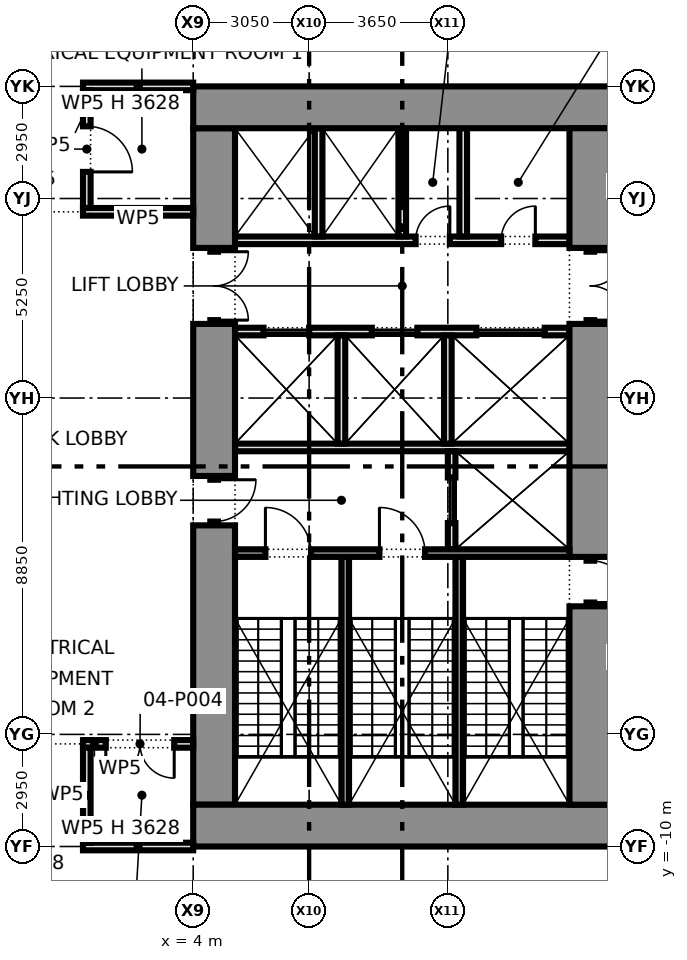
"""IFC4 building model, lengths in metres.
Left out: names, types, materials, properties, quantities, classifications, styles, units other than length and angle.
Written with IfcOpenShell. Run it as: python <this file> out.ifc"""

import sys

from ifc_helpers import new_model, si_unit, direction, frame, frame_2d, origin, place, context, subcontext, project, spatial, rectangle, extrude, element, fill, save


model = new_model("IFC4")
c1 = context("Model", 3, precision=1e-05, world=origin(), true_north=direction((0.0, 1.0)))
c2 = subcontext(c1, "Body", "Model", "MODEL_VIEW")
j1 = project(units=[si_unit("LENGTHUNIT", "METRE"), si_unit("PLANEANGLEUNIT", "RADIAN")], contexts=[c1])
p1 = place(None, origin())
s1 = spatial("IfcSite", under=j1, at=p1, CompositionType="ELEMENT")
p2 = place(p1, origin())
s2 = spatial("IfcBuilding", under=s1, at=p2, CompositionType="ELEMENT")
p3 = place(p2, frame((0.0, 0.0, 16.1)))
s3 = spatial("IfcBuildingStorey", under=s2, at=p3, CompositionType="ELEMENT", Elevation=16.1)
for number, where, z_axis, x_axis in (
    (1, (15.0, 9.45, 0.0), (0.0, 0.0, 1.0), (-1.0, 0.0, 0.0)),
    (2, (15.0, -9.45, 0.0), (0.0, 0.0, 1.0), (-1.0, 0.0, 0.0)),
):
    element("IfcWall", number, at=place(p3, frame(where, z_axis=z_axis, x_axis=x_axis)), inside=s3, PredefinedType="SHEAR", context=c2, shape_type="SweptSolid", body=[
        extrude(rectangle(XDim=11.0, YDim=1.1, at=frame_2d((5.5, 0.0))), origin(), (0.0, 0.0, 1.0), 4.575),
    ])
p4 = place(p3, frame((14.45, 8.9, 0.0), z_axis=(0.0, 0.0, 1.0), x_axis=(0.0, -1.0, 0.0)))
e3 = element("IfcWall", 3, at=p4, inside=s3, PredefinedType="SHEAR", context=c2, shape_type="SweptSolid", body=[
    extrude(rectangle(XDim=3.15, YDim=1.1, at=frame_2d((1.575, 0.0))), origin(), (0.0, 0.0, 1.0), 4.575),
])
p5 = place(p3, frame((14.45, 5.75, 0.0), z_axis=(0.0, 0.0, 1.0), x_axis=(0.0, -1.0, 0.0)))
e4 = element("IfcWall", 4, at=p5, inside=s3, PredefinedType="PARTITIONING", context=c2, shape_type="SweptSolid", body=[
    extrude(rectangle(XDim=2.0, YDim=0.2, at=frame_2d((1.0, 0.0))), origin(), (0.0, 0.0, 1.0), 2.4),
])
p6 = place(p5, frame((0.1, 0.0, 0.0)))
e5 = element("IfcOpeningElement", 5, at=p6, cuts=e4, PredefinedType="OPENING", context=c2, shape_type="SweptSolid", body=[
    extrude(rectangle(XDim=1.8, YDim=2.1, at=frame_2d((0.9, 1.05))), frame((0.0, 0.11, 0.0), z_axis=(0.0, -1.0, 0.0), x_axis=(1.0, 0.0, 0.0)), (0.0, 0.0, 1.0), 0.22),
])
p7 = place(p3, frame((14.45, 3.75, 0.0), z_axis=(0.0, 0.0, 1.0), x_axis=(0.0, -1.0, 0.0)))
e6 = element("IfcWall", 6, at=p7, inside=s3, PredefinedType="SHEAR", context=c2, shape_type="SweptSolid", body=[
    extrude(rectangle(XDim=6.13, YDim=1.1, at=frame_2d((3.065, 0.0))), origin(), (0.0, 0.0, 1.0), 4.575),
])
p8 = place(p3, frame((14.45, -2.38, 0.0), z_axis=(0.0, 0.0, 1.0), x_axis=(0.0, -1.0, 0.0)))
e7 = element("IfcWall", 7, at=p8, inside=s3, PredefinedType="SHEAR", context=c2, shape_type="SweptSolid", body=[
    extrude(rectangle(XDim=1.3, YDim=0.2, at=frame_2d((0.65, 0.0))), origin(), (0.0, 0.0, 1.0), 2.4),
])
p9 = place(p8, frame((0.1, 0.0, 0.0)))
e8 = element("IfcOpeningElement", 8, at=p9, cuts=e7, PredefinedType="OPENING", context=c2, shape_type="SweptSolid", body=[
    extrude(rectangle(XDim=1.1, YDim=2.1, at=frame_2d((0.55, 1.05))), frame((0.0, 0.11, 0.0), z_axis=(0.0, -1.0, 0.0), x_axis=(1.0, 0.0, 0.0)), (0.0, 0.0, 1.0), 0.22),
])
p10 = place(p3, frame((14.45, -3.68, 0.0), z_axis=(0.0, 0.0, 1.0), x_axis=(0.0, -1.0, 0.0)))
e9 = element("IfcWall", 9, at=p10, inside=s3, PredefinedType="SHEAR", context=c2, shape_type="SweptSolid", body=[
    extrude(rectangle(XDim=5.22, YDim=1.1, at=frame_2d((2.61, 0.0))), origin(), (0.0, 0.0, 1.0), 4.575),
])
p11 = place(p3, frame((4.55, 8.9, 0.0), z_axis=(0.0, 0.0, 1.0), x_axis=(0.0, -1.0, 0.0)))
e10 = element("IfcWall", 10, at=p11, inside=s3, PredefinedType="SHEAR", context=c2, shape_type="SweptSolid", body=[
    extrude(rectangle(XDim=3.15, YDim=1.1, at=frame_2d((1.575, 0.0))), origin(), (0.0, 0.0, 1.0), 4.575),
])
p12 = place(p3, frame((4.55, 5.75, 0.0), z_axis=(0.0, 0.0, 1.0), x_axis=(0.0, -1.0, 0.0)))
e11 = element("IfcWall", 11, at=p12, inside=s3, PredefinedType="PARTITIONING", context=c2, shape_type="SweptSolid", body=[
    extrude(rectangle(XDim=2.0, YDim=0.2, at=frame_2d((1.0, 0.0))), origin(), (0.0, 0.0, 1.0), 2.4),
])
p13 = place(p12, frame((0.1, 0.0, 0.0)))
e12 = element("IfcOpeningElement", 12, at=p13, cuts=e11, PredefinedType="OPENING", context=c2, shape_type="SweptSolid", body=[
    extrude(rectangle(XDim=1.8, YDim=2.1, at=frame_2d((0.9, 1.05))), frame((0.0, 0.11, 0.0), z_axis=(0.0, -1.0, 0.0), x_axis=(1.0, 0.0, 0.0)), (0.0, 0.0, 1.0), 0.22),
])
p14 = place(p3, frame((4.55, 3.75, 0.0), z_axis=(0.0, 0.0, 1.0), x_axis=(0.0, -1.0, 0.0)))
e13 = element("IfcWall", 13, at=p14, inside=s3, PredefinedType="SHEAR", context=c2, shape_type="SweptSolid", body=[
    extrude(rectangle(XDim=4.0, YDim=1.1, at=frame_2d((2.0, 0.0))), origin(), (0.0, 0.0, 1.0), 4.575),
])
p15 = place(p3, frame((4.55, -0.25, 0.0), z_axis=(0.0, 0.0, 1.0), x_axis=(0.0, -1.0, 0.0)))
e14 = element("IfcWall", 14, at=p15, inside=s3, PredefinedType="PARTITIONING", context=c2, shape_type="SweptSolid", body=[
    extrude(rectangle(XDim=1.3, YDim=0.2, at=frame_2d((0.65, 0.0))), origin(), (0.0, 0.0, 1.0), 2.4),
])
p16 = place(p15, frame((0.1, 0.0, 0.0)))
e15 = element("IfcOpeningElement", 15, at=p16, cuts=e14, PredefinedType="OPENING", context=c2, shape_type="SweptSolid", body=[
    extrude(rectangle(XDim=1.1, YDim=2.1, at=frame_2d((0.55, 1.05))), frame((0.0, 0.11, 0.0), z_axis=(0.0, -1.0, 0.0), x_axis=(1.0, 0.0, 0.0)), (0.0, 0.0, 1.0), 0.22),
])
p17 = place(p3, frame((4.55, -1.55, 0.0), z_axis=(0.0, 0.0, 1.0), x_axis=(0.0, -1.0, 0.0)))
e16 = element("IfcWall", 16, at=p17, inside=s3, PredefinedType="SHEAR", context=c2, shape_type="SweptSolid", body=[
    extrude(rectangle(XDim=7.35, YDim=1.1, at=frame_2d((3.675, 0.0))), origin(), (0.0, 0.0, 1.0), 4.575),
])
p18 = place(p3, frame((13.9, 5.95, 0.0), z_axis=(0.0, 0.0, 1.0), x_axis=(-1.0, 0.0, 0.0)))
e17 = element("IfcWall", 17, at=p18, inside=s3, PredefinedType="PARTITIONING", context=c2, shape_type="SweptSolid", body=[
    extrude(rectangle(XDim=8.8, YDim=0.2, at=frame_2d((4.4, 0.0))), origin(), (0.0, 0.0, 1.0), 4.575),
])
p19 = place(p18, frame((0.897, 0.0, 0.0)))
e18 = element("IfcOpeningElement", 18, at=p19, cuts=e17, PredefinedType="OPENING", context=c2, shape_type="SweptSolid", body=[
    extrude(rectangle(XDim=0.9, YDim=2.1, at=frame_2d((0.45, 1.05))), frame((0.0, 0.11, 0.0), z_axis=(0.0, -1.0, 0.0), x_axis=(1.0, 0.0, 0.0)), (0.0, 0.0, 1.0), 0.22),
])
p20 = place(p18, frame((3.147, 0.0, 0.0)))
e19 = element("IfcOpeningElement", 19, at=p20, cuts=e17, PredefinedType="OPENING", context=c2, shape_type="SweptSolid", body=[
    extrude(rectangle(XDim=0.9, YDim=2.1, at=frame_2d((0.45, 1.05))), frame((0.0, 0.11, 0.0), z_axis=(0.0, -1.0, 0.0), x_axis=(1.0, 0.0, 0.0)), (0.0, 0.0, 1.0), 0.22),
])
p21 = place(p3, frame((13.9, 3.55, 0.0), z_axis=(0.0, 0.0, 1.0), x_axis=(-1.0, 0.0, 0.0)))
e20 = element("IfcWall", 20, at=p21, inside=s3, PredefinedType="PARTITIONING", context=c2, shape_type="SweptSolid", body=[
    extrude(rectangle(XDim=8.8, YDim=0.2, at=frame_2d((4.4, 0.0))), origin(), (0.0, 0.0, 1.0), 4.575),
])
p22 = place(p21, frame((0.65, 0.0, 0.0)))
e21 = element("IfcOpeningElement", 21, at=p22, cuts=e20, PredefinedType="OPENING", context=c2, shape_type="SweptSolid", body=[
    extrude(rectangle(XDim=1.8, YDim=2.1, at=frame_2d((0.9, 1.05))), frame((0.0, 0.11, 0.0), z_axis=(0.0, -1.0, 0.0), x_axis=(1.0, 0.0, 0.0)), (0.0, 0.0, 1.0), 0.22),
])
p23 = place(p21, frame((4.0, 0.0, 0.0)))
e22 = element("IfcOpeningElement", 22, at=p23, cuts=e20, PredefinedType="OPENING", context=c2, shape_type="SweptSolid", body=[
    extrude(rectangle(XDim=1.2, YDim=2.1, at=frame_2d((0.6, 1.05))), frame((0.0, 0.11, 0.0), z_axis=(0.0, -1.0, 0.0), x_axis=(1.0, 0.0, 0.0)), (0.0, 0.0, 1.0), 0.22),
])
p24 = place(p21, frame((6.85, 0.0, 0.0)))
e23 = element("IfcOpeningElement", 23, at=p24, cuts=e20, PredefinedType="OPENING", context=c2, shape_type="SweptSolid", body=[
    extrude(rectangle(XDim=1.2, YDim=2.1, at=frame_2d((0.6, 1.05))), frame((0.0, 0.11, 0.0), z_axis=(0.0, -1.0, 0.0), x_axis=(1.0, 0.0, 0.0)), (0.0, 0.0, 1.0), 0.22),
])
p25 = place(p3, frame((13.9, 0.5, 0.0), z_axis=(0.0, 0.0, 1.0), x_axis=(-1.0, 0.0, 0.0)))
e24 = element("IfcWall", 24, at=p25, inside=s3, PredefinedType="PARTITIONING", context=c2, shape_type="SweptSolid", body=[
    extrude(rectangle(XDim=8.8, YDim=0.2, at=frame_2d((4.4, 0.0))), origin(), (0.0, 0.0, 1.0), 4.575),
])
p26 = place(p3, frame((10.8, 0.4, 0.0), z_axis=(0.0, 0.0, 1.0), x_axis=(0.0, -1.0, 0.0)))
e25 = element("IfcWall", 25, at=p26, inside=s3, PredefinedType="PARTITIONING", context=c2, shape_type="SweptSolid", body=[
    extrude(rectangle(XDim=2.58, YDim=0.2, at=frame_2d((1.29, 0.0))), origin(), (0.0, 0.0, 1.0), 4.575),
])
p27 = place(p26, frame((0.69, 0.0, 0.0)))
e26 = element("IfcOpeningElement", 26, at=p27, cuts=e25, PredefinedType="OPENING", context=c2, shape_type="SweptSolid", body=[
    extrude(rectangle(XDim=1.2, YDim=2.1, at=frame_2d((0.6, 1.05))), frame((0.0, 0.11, 0.0), z_axis=(0.0, -1.0, 0.0), x_axis=(1.0, 0.0, 0.0)), (0.0, 0.0, 1.0), 0.22),
])
p28 = place(p3, frame((13.9, -2.28, 0.0), z_axis=(0.0, 0.0, 1.0), x_axis=(-1.0, 0.0, 0.0)))
e27 = element("IfcWall", 27, at=p28, inside=s3, PredefinedType="SHEAR", context=c2, shape_type="SweptSolid", body=[
    extrude(rectangle(XDim=8.8, YDim=0.2, at=frame_2d((4.4, 0.0))), origin(), (0.0, 0.0, 1.0), 4.575),
])
p29 = place(p28, frame((3.8, 0.0, 0.0)))
e28 = element("IfcOpeningElement", 28, at=p29, cuts=e27, PredefinedType="OPENING", context=c2, shape_type="SweptSolid", body=[
    extrude(rectangle(XDim=1.2, YDim=2.1, at=frame_2d((0.6, 1.05))), frame((0.0, 0.11, 0.0), z_axis=(0.0, -1.0, 0.0), x_axis=(1.0, 0.0, 0.0)), (0.0, 0.0, 1.0), 0.22),
])
p30 = place(p28, frame((6.8, 0.0, 0.0)))
e29 = element("IfcOpeningElement", 29, at=p30, cuts=e27, PredefinedType="OPENING", context=c2, shape_type="SweptSolid", body=[
    extrude(rectangle(XDim=1.2, YDim=2.1, at=frame_2d((0.6, 1.05))), frame((0.0, 0.11, 0.0), z_axis=(0.0, -1.0, 0.0), x_axis=(1.0, 0.0, 0.0)), (0.0, 0.0, 1.0), 0.22),
])
for number, where, z_axis, x_axis in (
    (30, (11.0, -2.38, 0.0), (0.0, 0.0, 1.0), (0.0, -1.0, 0.0)),
    (31, (8.0, -2.38, 0.0), (0.0, 0.0, 1.0), (0.0, -1.0, 0.0)),
):
    element("IfcWall", number, at=place(p3, frame(where, z_axis=z_axis, x_axis=x_axis)), inside=s3, PredefinedType="SHEAR", context=c2, shape_type="SweptSolid", body=[
        extrude(rectangle(XDim=6.52, YDim=0.2, at=frame_2d((3.26, 0.0))), origin(), (0.0, 0.0, 1.0), 4.575),
    ])
for number, where, z_axis, x_axis in (
    (32, (9.5, 8.9, 0.0), (0.0, 0.0, 1.0), (0.0, -1.0, 0.0)),
    (33, (7.3, 8.9, 0.0), (0.0, 0.0, 1.0), (0.0, -1.0, 0.0)),
    (34, (11.105, 8.9, 0.0), (0.0, 0.0, 1.0), (0.0, -1.0, 0.0)),
    (35, (10.7, 3.45, 0.0), (0.0, 0.0, 1.0), (0.0, -1.0, 0.0)),
    (36, (7.9, 3.45, 0.0), (0.0, 0.0, 1.0), (0.0, -1.0, 0.0)),
):
    element("IfcWall", number, at=place(p3, frame(where, z_axis=z_axis, x_axis=x_axis)), inside=s3, PredefinedType="PARTITIONING", context=c2, shape_type="SweptSolid", body=[
        extrude(rectangle(XDim=2.85, YDim=0.2, at=frame_2d((1.425, 0.0))), origin(), (0.0, 0.0, 1.0), 4.575),
    ])
p31 = place(p3, frame((1.1, -10.0, 0.0), z_axis=(0.0, 0.0, 1.0), x_axis=(1.0, 0.0, 0.0)))
e37 = element("IfcWall", 37, at=p31, inside=s3, PredefinedType="PARTITIONING", context=c2, shape_type="SweptSolid", body=[
    extrude(rectangle(XDim=2.9, YDim=0.2, at=frame_2d((1.45, 0.0))), origin(), (0.0, 0.0, 1.0), 3.627),
])
p32 = place(p3, frame((1.1, -7.3, 0.0), z_axis=(0.0, 0.0, 1.0), x_axis=(1.0, 0.0, 0.0)))
e38 = element("IfcWall", 38, at=p32, inside=s3, PredefinedType="PARTITIONING", context=c2, shape_type="SweptSolid", body=[
    extrude(rectangle(XDim=2.9, YDim=0.2, at=frame_2d((1.45, 0.0))), origin(), (0.0, 0.0, 1.0), 4.575),
])
p33 = place(p32, frame((0.6, 0.0, 0.0)))
e39 = element("IfcOpeningElement", 39, at=p33, cuts=e38, PredefinedType="OPENING", context=c2, shape_type="SweptSolid", body=[
    extrude(rectangle(XDim=1.8, YDim=2.1, at=frame_2d((0.9, 1.05))), frame((0.0, 0.11, 0.0), z_axis=(0.0, -1.0, 0.0), x_axis=(1.0, 0.0, 0.0)), (0.0, 0.0, 1.0), 0.22),
])
p34 = place(p3, frame((1.1, 6.7, 0.0), z_axis=(0.0, 0.0, 1.0), x_axis=(1.0, 0.0, 0.0)))
e40 = element("IfcWall", 40, at=p34, inside=s3, PredefinedType="PARTITIONING", context=c2, shape_type="SweptSolid", body=[
    extrude(rectangle(XDim=2.9, YDim=0.2, at=frame_2d((1.45, 0.0))), origin(), (0.0, 0.0, 1.0), 4.575),
])
p35 = place(p3, frame((1.1, 10.0, 0.0), z_axis=(0.0, 0.0, 1.0), x_axis=(1.0, 0.0, 0.0)))
e41 = element("IfcWall", 41, at=p35, inside=s3, PredefinedType="PARTITIONING", context=c2, shape_type="SweptSolid", body=[
    extrude(rectangle(XDim=2.9, YDim=0.2, at=frame_2d((1.45, 0.0))), origin(), (0.0, 0.0, 1.0), 3.627),
])
p36 = place(p3, frame((1.2, -9.9, 0.0), z_axis=(0.0, 0.0, 1.0), x_axis=(0.0, 1.0, 0.0)))
e42 = element("IfcWall", 42, at=p36, inside=s3, PredefinedType="PARTITIONING", context=c2, shape_type="SweptSolid", body=[
    extrude(rectangle(XDim=2.5, YDim=0.2, at=frame_2d((1.25, 0.0))), origin(), (0.0, 0.0, 1.0), 4.575),
])
p37 = place(p3, frame((1.2, 6.8, 0.0), z_axis=(0.0, 0.0, 1.0), x_axis=(0.0, 1.0, 0.0)))
e43 = element("IfcWall", 43, at=p37, inside=s3, PredefinedType="PARTITIONING", context=c2, shape_type="SweptSolid", body=[
    extrude(rectangle(XDim=3.1, YDim=0.2, at=frame_2d((1.55, 0.0))), origin(), (0.0, 0.0, 1.0), 4.575),
])
p38 = place(p37, frame((0.95, 0.0, 0.0)))
e44 = element("IfcOpeningElement", 44, at=p38, cuts=e43, PredefinedType="OPENING", context=c2, shape_type="SweptSolid", body=[
    extrude(rectangle(XDim=1.2, YDim=2.1, at=frame_2d((0.6, 1.05))), frame((0.0, 0.11, 0.0), z_axis=(0.0, -1.0, 0.0), x_axis=(1.0, 0.0, 0.0)), (0.0, 0.0, 1.0), 0.22),
])
p39 = place(p6, origin())
e45 = element("IfcDoor", 45, at=p39, inside=s3, OperationType="DOUBLE_DOOR_SINGLE_SWING", PredefinedType="DOOR", context=c2, shape_type="SweptSolid", body=[
    extrude(rectangle(XDim=1.8, YDim=2.1, at=frame_2d((0.9, 1.05))), frame((0.0, 0.025, 0.0), z_axis=(0.0, -1.0, 0.0), x_axis=(1.0, 0.0, 0.0)), (0.0, 0.0, 1.0), 0.05),
])
fill(e5, e45)
p40 = place(p9, origin())
e46 = element("IfcDoor", 46, at=p40, inside=s3, OperationType="SINGLE_SWING_RIGHT", PredefinedType="DOOR", context=c2, shape_type="SweptSolid", body=[
    extrude(rectangle(XDim=1.1, YDim=2.1, at=frame_2d((0.55, 1.05))), frame((0.0, 0.025, 0.0), z_axis=(0.0, -1.0, 0.0), x_axis=(1.0, 0.0, 0.0)), (0.0, 0.0, 1.0), 0.05),
])
fill(e8, e46)
p41 = place(p13, origin())
e47 = element("IfcDoor", 47, at=p41, inside=s3, OperationType="DOUBLE_DOOR_SINGLE_SWING", PredefinedType="DOOR", context=c2, shape_type="SweptSolid", body=[
    extrude(rectangle(XDim=1.8, YDim=2.1, at=frame_2d((0.9, 1.05))), frame((0.0, 0.025, 0.0), z_axis=(0.0, -1.0, 0.0), x_axis=(1.0, 0.0, 0.0)), (0.0, 0.0, 1.0), 0.05),
])
fill(e12, e47)
p42 = place(p16, origin())
e48 = element("IfcDoor", 48, at=p42, inside=s3, OperationType="SINGLE_SWING_LEFT", PredefinedType="DOOR", context=c2, shape_type="SweptSolid", body=[
    extrude(rectangle(XDim=1.1, YDim=2.1, at=frame_2d((0.55, 1.05))), frame((0.0, 0.025, 0.0), z_axis=(0.0, -1.0, 0.0), x_axis=(1.0, 0.0, 0.0)), (0.0, 0.0, 1.0), 0.05),
])
fill(e15, e48)
p43 = place(p22, origin())
e49 = element("IfcDoor", 49, at=p43, inside=s3, OperationType="DOUBLE_DOOR_SLIDING", PredefinedType="DOOR", context=c2, shape_type="SweptSolid", body=[
    extrude(rectangle(XDim=1.8, YDim=2.1, at=frame_2d((0.9, 1.05))), frame((0.0, 0.025, 0.0), z_axis=(0.0, -1.0, 0.0), x_axis=(1.0, 0.0, 0.0)), (0.0, 0.0, 1.0), 0.05),
])
fill(e21, e49)
p44 = place(p23, origin())
e50 = element("IfcDoor", 50, at=p44, inside=s3, OperationType="DOUBLE_DOOR_SLIDING", PredefinedType="DOOR", context=c2, shape_type="SweptSolid", body=[
    extrude(rectangle(XDim=1.2, YDim=2.1, at=frame_2d((0.6, 1.05))), frame((0.0, 0.025, 0.0), z_axis=(0.0, -1.0, 0.0), x_axis=(1.0, 0.0, 0.0)), (0.0, 0.0, 1.0), 0.05),
])
fill(e22, e50)
p45 = place(p24, origin())
e51 = element("IfcDoor", 51, at=p45, inside=s3, OperationType="DOUBLE_DOOR_SLIDING", PredefinedType="DOOR", context=c2, shape_type="SweptSolid", body=[
    extrude(rectangle(XDim=1.2, YDim=2.1, at=frame_2d((0.6, 1.05))), frame((0.0, 0.025, 0.0), z_axis=(0.0, -1.0, 0.0), x_axis=(1.0, 0.0, 0.0)), (0.0, 0.0, 1.0), 0.05),
])
fill(e23, e51)
p46 = place(p27, origin())
e52 = element("IfcDoor", 52, at=p46, inside=s3, OperationType="DOUBLE_DOOR_SLIDING", PredefinedType="DOOR", context=c2, shape_type="SweptSolid", body=[
    extrude(rectangle(XDim=1.2, YDim=2.1, at=frame_2d((0.6, 1.05))), frame((0.0, 0.025, 0.0), z_axis=(0.0, -1.0, 0.0), x_axis=(1.0, 0.0, 0.0)), (0.0, 0.0, 1.0), 0.05),
])
fill(e26, e52)
p47 = place(p19, frame((0.9, 0.0, 0.0), z_axis=(0.0, 0.0, 1.0), x_axis=(-1.0, 0.0, 0.0)))
e53 = element("IfcDoor", 53, at=p47, inside=s3, OperationType="SINGLE_SWING_RIGHT", PredefinedType="DOOR", context=c2, shape_type="SweptSolid", body=[
    extrude(rectangle(XDim=0.9, YDim=2.1, at=frame_2d((0.45, 1.05))), frame((0.0, 0.025, 0.0), z_axis=(0.0, -1.0, 0.0), x_axis=(1.0, 0.0, 0.0)), (0.0, 0.0, 1.0), 0.05),
])
fill(e18, e53)
p48 = place(p20, frame((0.9, 0.0, 0.0), z_axis=(0.0, 0.0, 1.0), x_axis=(-1.0, 0.0, 0.0)))
e54 = element("IfcDoor", 54, at=p48, inside=s3, OperationType="SINGLE_SWING_RIGHT", PredefinedType="DOOR", context=c2, shape_type="SweptSolid", body=[
    extrude(rectangle(XDim=0.9, YDim=2.1, at=frame_2d((0.45, 1.05))), frame((0.0, 0.025, 0.0), z_axis=(0.0, -1.0, 0.0), x_axis=(1.0, 0.0, 0.0)), (0.0, 0.0, 1.0), 0.05),
])
fill(e19, e54)
p49 = place(p29, frame((1.2, 0.0, 0.0), z_axis=(0.0, 0.0, 1.0), x_axis=(-1.0, 0.0, 0.0)))
e55 = element("IfcDoor", 55, at=p49, inside=s3, OperationType="SINGLE_SWING_LEFT", PredefinedType="DOOR", context=c2, shape_type="SweptSolid", body=[
    extrude(rectangle(XDim=1.2, YDim=2.1, at=frame_2d((0.6, 1.05))), frame((0.0, 0.025, 0.0), z_axis=(0.0, -1.0, 0.0), x_axis=(1.0, 0.0, 0.0)), (0.0, 0.0, 1.0), 0.05),
])
fill(e28, e55)
p50 = place(p30, frame((1.2, 0.0, 0.0), z_axis=(0.0, 0.0, 1.0), x_axis=(-1.0, 0.0, 0.0)))
e56 = element("IfcDoor", 56, at=p50, inside=s3, OperationType="SINGLE_SWING_LEFT", PredefinedType="DOOR", context=c2, shape_type="SweptSolid", body=[
    extrude(rectangle(XDim=1.2, YDim=2.1, at=frame_2d((0.6, 1.05))), frame((0.0, 0.025, 0.0), z_axis=(0.0, -1.0, 0.0), x_axis=(1.0, 0.0, 0.0)), (0.0, 0.0, 1.0), 0.05),
])
fill(e29, e56)
p51 = place(p38, frame((1.2, 0.0, 0.0), z_axis=(0.0, 0.0, 1.0), x_axis=(-1.0, 0.0, 0.0)))
e57 = element("IfcDoor", 57, at=p51, inside=s3, OperationType="SINGLE_SWING_RIGHT", PredefinedType="DOOR", context=c2, shape_type="SweptSolid", body=[
    extrude(rectangle(XDim=1.2, YDim=2.1, at=frame_2d((0.6, 1.05))), frame((0.0, 0.025, 0.0), z_axis=(0.0, -1.0, 0.0), x_axis=(1.0, 0.0, 0.0)), (0.0, 0.0, 1.0), 0.05),
])
fill(e44, e57)
p52 = place(p33, frame((1.8, 0.0, 0.0), z_axis=(0.0, 0.0, 1.0), x_axis=(-1.0, 0.0, 0.0)))
e58 = element("IfcDoor", 58, at=p52, inside=s3, OperationType="DOUBLE_DOOR_SINGLE_SWING", PredefinedType="DOOR", context=c2, shape_type="SweptSolid", body=[
    extrude(rectangle(XDim=1.8, YDim=2.1, at=frame_2d((0.9, 1.05))), frame((0.0, 0.025, 0.0), z_axis=(0.0, -1.0, 0.0), x_axis=(1.0, 0.0, 0.0)), (0.0, 0.0, 1.0), 0.05),
])
fill(e39, e58)
save(model, sys.argv[1])
